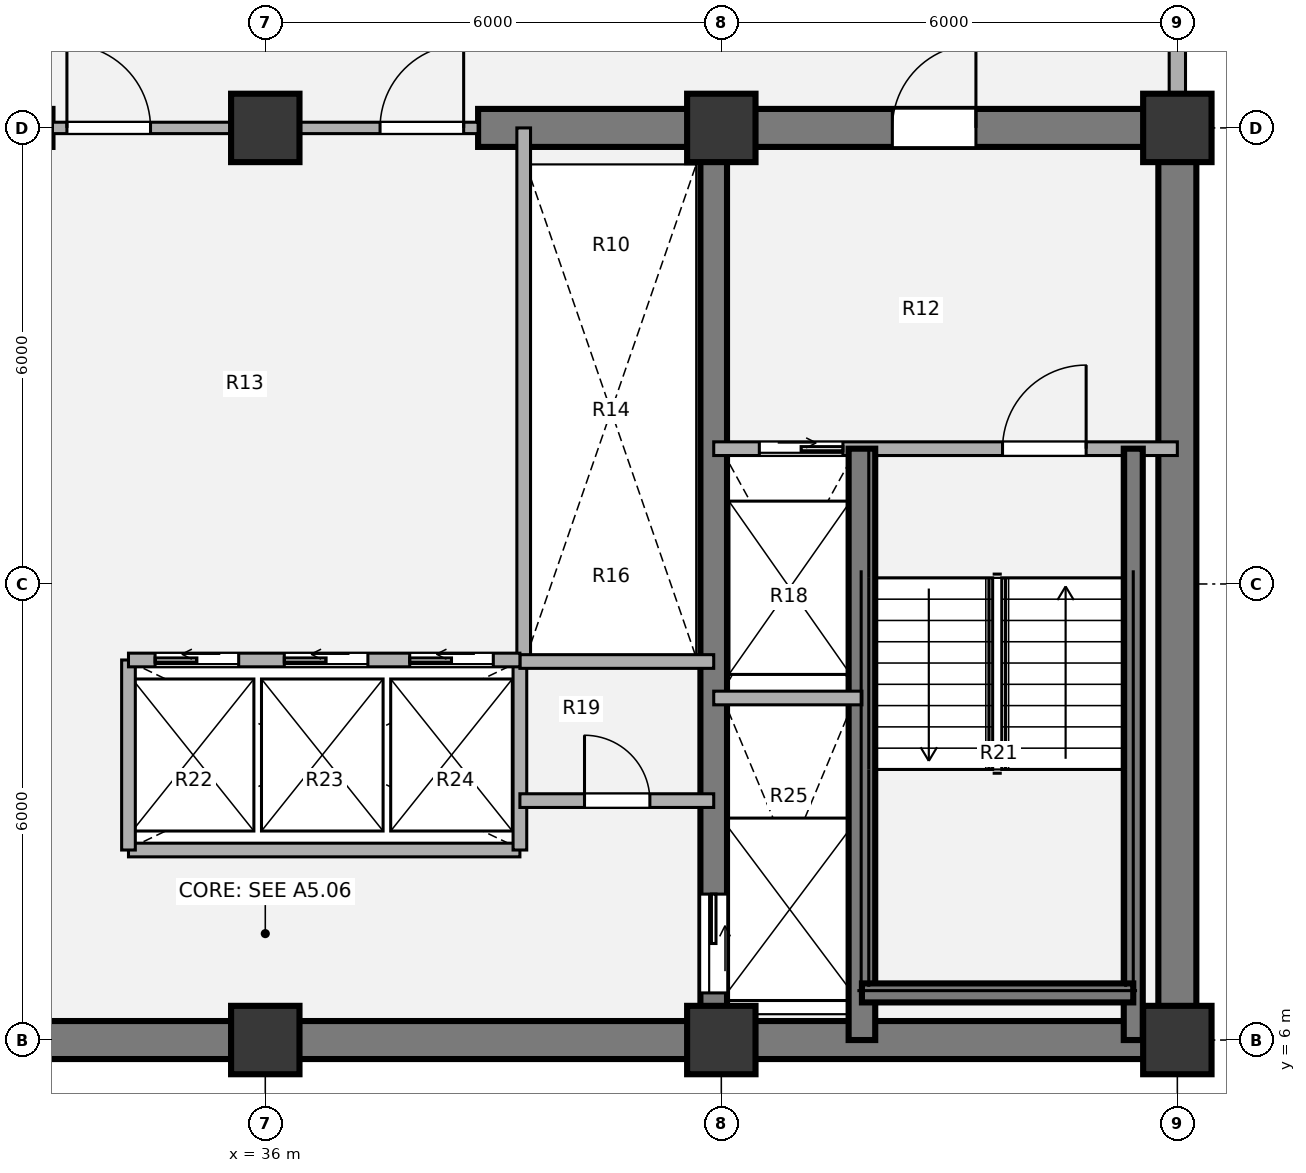
"""IFC4 building model, lengths in metres.
Left out: names, types, materials, properties, quantities, classifications, styles, units other than length and angle.
Written with IfcOpenShell. Run it as: python <this file> out.ifc"""

import sys

from ifc_helpers import new_model, si_unit, direction, frame, frame_2d, origin, origin_2d, place, context, subcontext, project, spatial, rectangle, extrude, source, transform, mapped, element, fill, save


model = new_model("IFC4")
c1 = context("Model", 3, precision=1e-05, world=origin(), true_north=direction((0.0, 1.0)))
c2 = subcontext(c1, "Body", "Model", "MODEL_VIEW")
j1 = project(units=[si_unit("LENGTHUNIT", "METRE"), si_unit("PLANEANGLEUNIT", "RADIAN")], contexts=[c1])
p1 = place(None, origin())
s1 = spatial("IfcSite", under=j1, at=p1, CompositionType="ELEMENT")
p2 = place(p1, origin())
s2 = spatial("IfcBuilding", under=s1, at=p2, CompositionType="ELEMENT")
p3 = place(p2, frame((0.0, 0.0, 116.28)))
s3 = spatial("IfcBuildingStorey", under=s2, at=p3, CompositionType="ELEMENT", Elevation=116.28)
m1 = source(origin(), c2, "Body", "SweptSolid", [
    extrude(rectangle(XDim=0.9, YDim=0.9, at=origin_2d()), origin(), (0.0, 0.0, 1.0), 3.78),
])
for number, where, z_axis, x_axis in (
    (1, (36.0, 6.0, 0.0), (0.0, 0.0, 1.0), (1.0, 0.0, 0.0)),
    (2, (42.0, 6.0, 0.0), (0.0, 0.0, 1.0), (1.0, 0.0, 0.0)),
    (3, (48.0, 6.0, 0.0), (0.0, 0.0, 1.0), (1.0, 0.0, 0.0)),
    (4, (36.0, 18.0, 0.0), (0.0, 0.0, 1.0), (1.0, 0.0, 0.0)),
    (5, (42.0, 18.0, 0.0), (0.0, 0.0, 1.0), (1.0, 0.0, 0.0)),
    (6, (48.0, 18.0, 0.0), (0.0, 0.0, 1.0), (1.0, 0.0, 0.0)),
):
    element("IfcColumn", number, at=place(p3, frame(where, z_axis=z_axis, x_axis=x_axis)), inside=s3, PredefinedType="COLUMN", context=c2, shape_type="MappedRepresentation", body=[
        mapped(m1, transform((0.0, 0.0, 0.0), x_axis=(1.0, 0.0, 0.0), y_axis=(0.0, 1.0, 0.0), z_axis=(0.0, 0.0, 1.0), scale=1.0)),
    ])
p4 = place(p3, frame((48.25, 6.0, 0.0), z_axis=(0.0, 0.0, 1.0), x_axis=(-1.0, 0.0, 0.0)))
e7 = element("IfcWall", 7, at=p4, inside=s3, PredefinedType="SHEAR", context=c2, shape_type="SweptSolid", body=[
    extrude(rectangle(XDim=24.5, YDim=0.5, at=frame_2d((12.25, 0.0))), origin(), (0.0, 0.0, 1.0), 3.78),
])
p5 = place(p3, frame((48.0, 18.0, 0.0), z_axis=(0.0, 0.0, 1.0), x_axis=(0.0, -1.0, 0.0)))
e8 = element("IfcWall", 8, at=p5, inside=s3, PredefinedType="SHEAR", context=c2, shape_type="SweptSolid", body=[
    extrude(rectangle(XDim=12.0, YDim=0.5, at=frame_2d((6.0, 0.0))), origin(), (0.0, 0.0, 1.0), 3.78),
])
p6 = place(p3, frame((23.75, 18.0, 0.0), z_axis=(0.0, 0.0, 1.0), x_axis=(1.0, 0.0, 0.0)))
e9 = element("IfcWall", 9, at=p6, inside=s3, PredefinedType="SHEAR", context=c2, shape_type="SweptSolid", body=[
    extrude(rectangle(XDim=9.45, YDim=0.5, at=frame_2d((4.725, 0.0))), origin(), (0.0, 0.0, 1.0), 3.78),
])
p7 = place(p6, frame((2.95, 0.0, 0.0)))
e10 = element("IfcOpeningElement", 10, at=p7, cuts=e9, PredefinedType="OPENING", context=c2, shape_type="SweptSolid", body=[
    extrude(rectangle(XDim=1.1, YDim=2.1, at=origin_2d()), frame((0.55, 0.26, 1.05), z_axis=(0.0, -1.0, 0.0), x_axis=(1.0, 0.0, 0.0)), (0.0, 0.0, 1.0), 0.52),
])
p8 = place(p3, frame((38.8, 18.0, 0.0), z_axis=(0.0, 0.0, 1.0), x_axis=(1.0, 0.0, 0.0)))
e11 = element("IfcWall", 11, at=p8, inside=s3, PredefinedType="SHEAR", context=c2, shape_type="SweptSolid", body=[
    extrude(rectangle(XDim=9.45, YDim=0.5, at=frame_2d((4.725, 0.0))), origin(), (0.0, 0.0, 1.0), 3.78),
])
p9 = place(p8, frame((5.45, 0.0, 0.0)))
e12 = element("IfcOpeningElement", 12, at=p9, cuts=e11, PredefinedType="OPENING", context=c2, shape_type="SweptSolid", body=[
    extrude(rectangle(XDim=1.1, YDim=2.1, at=origin_2d()), frame((0.55, 0.26, 1.05), z_axis=(0.0, -1.0, 0.0), x_axis=(1.0, 0.0, 0.0)), (0.0, 0.0, 1.0), 0.52),
])
p10 = place(p3, frame((41.9, 18.0, 0.0), z_axis=(0.0, 0.0, 1.0), x_axis=(0.0, -1.0, 0.0)))
e13 = element("IfcWall", 13, at=p10, inside=s3, PredefinedType="SHEAR", context=c2, shape_type="SweptSolid", body=[
    extrude(rectangle(XDim=12.0, YDim=0.35, at=frame_2d((6.0, 0.0))), origin(), (0.0, 0.0, 1.0), 3.78),
])
p11 = place(p10, frame((10.08, 0.0, 0.0)))
e14 = element("IfcOpeningElement", 14, at=p11, cuts=e13, PredefinedType="OPENING", context=c2, shape_type="SweptSolid", body=[
    extrude(rectangle(XDim=1.3, YDim=2.1, at=origin_2d()), frame((0.65, 0.185, 1.05), z_axis=(0.0, -1.0, 0.0), x_axis=(1.0, 0.0, 0.0)), (0.0, 0.0, 1.0), 0.37),
])
p12 = place(p3, frame((48.0, 21.05, 0.0), z_axis=(0.0, 0.0, 1.0), x_axis=(0.0, -1.0, 0.0)))
e15 = element("IfcWall", 15, at=p12, inside=s3, PredefinedType="SOLIDWALL", context=c2, shape_type="SweptSolid", body=[
    extrude(rectangle(XDim=2.62, YDim=0.215, at=frame_2d((1.31, 0.0))), origin(), (0.0, 0.0, 1.0), 3.53),
])
p13 = place(p3, frame((34.2, 8.5, 0.0), z_axis=(0.0, 0.0, 1.0), x_axis=(1.0, 0.0, 0.0)))
e16 = element("IfcWall", 16, at=p13, inside=s3, PredefinedType="PARTITIONING", context=c2, shape_type="SweptSolid", body=[
    extrude(rectangle(XDim=5.15, YDim=0.18, at=frame_2d((2.575, 0.0))), origin(), (0.0, 0.0, 1.0), 3.5),
])
for number, where, z_axis, x_axis in (
    (17, (34.2, 8.5, 0.0), (0.0, 0.0, 1.0), (0.0, 1.0, 0.0)),
    (18, (39.35, 8.5, 0.0), (0.0, 0.0, 1.0), (0.0, 1.0, 0.0)),
):
    element("IfcWall", number, at=place(p3, frame(where, z_axis=z_axis, x_axis=x_axis)), inside=s3, PredefinedType="PARTITIONING", context=c2, shape_type="SweptSolid", body=[
        extrude(rectangle(XDim=2.5, YDim=0.18, at=frame_2d((1.25, 0.0))), origin(), (0.0, 0.0, 1.0), 3.5),
    ])
p14 = place(p3, frame((39.4, 11.0, 0.0), z_axis=(0.0, 0.0, 1.0), x_axis=(0.0, 1.0, 0.0)))
e19 = element("IfcWall", 19, at=p14, inside=s3, PredefinedType="PARTITIONING", context=c2, shape_type="SweptSolid", body=[
    extrude(rectangle(XDim=7.0, YDim=0.18, at=frame_2d((3.5, 0.0))), origin(), (0.0, 0.0, 1.0), 3.5),
])
p15 = place(p3, frame((39.35, 10.98, 0.0), z_axis=(0.0, 0.0, 1.0), x_axis=(1.0, 0.0, 0.0)))
e20 = element("IfcWall", 20, at=p15, inside=s3, PredefinedType="PARTITIONING", context=c2, shape_type="SweptSolid", body=[
    extrude(rectangle(XDim=2.55, YDim=0.18, at=frame_2d((1.275, 0.0))), origin(), (0.0, 0.0, 1.0), 3.5),
])
p16 = place(p3, frame((39.35, 9.15, 0.0), z_axis=(0.0, 0.0, 1.0), x_axis=(1.0, 0.0, 0.0)))
e21 = element("IfcWall", 21, at=p16, inside=s3, PredefinedType="PARTITIONING", context=c2, shape_type="SweptSolid", body=[
    extrude(rectangle(XDim=2.55, YDim=0.18, at=frame_2d((1.275, 0.0))), origin(), (0.0, 0.0, 1.0), 3.5),
])
p17 = place(p16, frame((0.85, 0.0, 0.0)))
e22 = element("IfcOpeningElement", 22, at=p17, cuts=e21, PredefinedType="OPENING", context=c2, shape_type="SweptSolid", body=[
    extrude(rectangle(XDim=0.86, YDim=2.1, at=origin_2d()), frame((0.43, 0.1, 1.05), z_axis=(0.0, -1.0, 0.0), x_axis=(1.0, 0.0, 0.0)), (0.0, 0.0, 1.0), 0.2),
])
p18 = place(p3, frame((33.2, 18.0, 0.0), z_axis=(0.0, 0.0, 1.0), x_axis=(1.0, 0.0, 0.0)))
e23 = element("IfcWall", 23, at=p18, inside=s3, PredefinedType="PARTITIONING", context=c2, shape_type="SweptSolid", body=[
    extrude(rectangle(XDim=5.6, YDim=0.15, at=frame_2d((2.8, 0.0))), origin(), (0.0, 0.0, 1.0), 2.315),
])
p19 = place(p18, frame((0.19, 0.0, 0.0)))
e24 = element("IfcOpeningElement", 24, at=p19, cuts=e23, PredefinedType="OPENING", context=c2, shape_type="SweptSolid", body=[
    extrude(rectangle(XDim=1.1, YDim=2.1, at=origin_2d()), frame((0.55, 0.085, 1.05), z_axis=(0.0, -1.0, 0.0), x_axis=(1.0, 0.0, 0.0)), (0.0, 0.0, 1.0), 0.17),
])
p20 = place(p18, frame((4.31, 0.0, 0.0)))
e25 = element("IfcOpeningElement", 25, at=p20, cuts=e23, PredefinedType="OPENING", context=c2, shape_type="SweptSolid", body=[
    extrude(rectangle(XDim=1.1, YDim=2.1, at=origin_2d()), frame((0.55, 0.085, 1.05), z_axis=(0.0, -1.0, 0.0), x_axis=(1.0, 0.0, 0.0)), (0.0, 0.0, 1.0), 0.17),
])
p21 = place(p3, frame((41.9, 13.78, 0.0), z_axis=(0.0, 0.0, 1.0), x_axis=(1.0, 0.0, 0.0)))
e26 = element("IfcWall", 26, at=p21, inside=s3, PredefinedType="PARTITIONING", context=c2, shape_type="SweptSolid", body=[
    extrude(rectangle(XDim=6.1, YDim=0.18, at=frame_2d((3.05, 0.0))), origin(), (0.0, 0.0, 1.0), 3.5),
])
p22 = place(p21, frame((0.6, 0.0, 0.0)))
e27 = element("IfcOpeningElement", 27, at=p22, cuts=e26, PredefinedType="OPENING", context=c2, shape_type="SweptSolid", body=[
    extrude(rectangle(XDim=1.1, YDim=2.1, at=origin_2d()), frame((0.55, 0.1, 1.05), z_axis=(0.0, -1.0, 0.0), x_axis=(1.0, 0.0, 0.0)), (0.0, 0.0, 1.0), 0.2),
])
p23 = place(p21, frame((3.8, 0.0, 0.0)))
e28 = element("IfcOpeningElement", 28, at=p23, cuts=e26, PredefinedType="OPENING", context=c2, shape_type="SweptSolid", body=[
    extrude(rectangle(XDim=1.1, YDim=2.1, at=origin_2d()), frame((0.55, 0.1, 1.05), z_axis=(0.0, -1.0, 0.0), x_axis=(1.0, 0.0, 0.0)), (0.0, 0.0, 1.0), 0.2),
])
p24 = place(p3, frame((43.85, 6.0, 0.0), z_axis=(0.0, 0.0, 1.0), x_axis=(0.0, 1.0, 0.0)))
e29 = element("IfcWall", 29, at=p24, inside=s3, PredefinedType="SHEAR", context=c2, shape_type="SweptSolid", body=[
    extrude(rectangle(XDim=7.78, YDim=0.35, at=frame_2d((3.89, 0.0))), origin(), (0.0, 0.0, 1.0), 3.85),
])
p25 = place(p3, frame((47.42, 6.0, 0.0), z_axis=(0.0, 0.0, 1.0), x_axis=(0.0, 1.0, 0.0)))
e30 = element("IfcWall", 30, at=p25, inside=s3, PredefinedType="SHEAR", context=c2, shape_type="SweptSolid", body=[
    extrude(rectangle(XDim=7.78, YDim=0.25, at=frame_2d((3.89, 0.0))), origin(), (0.0, 0.0, 1.0), 3.85),
])
p26 = place(p3, frame((43.85, 6.62, 0.0), z_axis=(0.0, 0.0, 1.0), x_axis=(1.0, 0.0, 0.0)))
e31 = element("IfcWall", 31, at=p26, inside=s3, PredefinedType="SHEAR", context=c2, shape_type="SweptSolid", body=[
    extrude(rectangle(XDim=3.57, YDim=0.25, at=frame_2d((1.785, 0.0))), origin(), (0.0, 0.0, 1.0), 3.85),
])
p27 = place(p3, frame((41.9, 10.5, 0.0), z_axis=(0.0, 0.0, 1.0), x_axis=(1.0, 0.0, 0.0)))
e32 = element("IfcWall", 32, at=p27, inside=s3, PredefinedType="PARTITIONING", context=c2, shape_type="SweptSolid", body=[
    extrude(rectangle(XDim=1.95, YDim=0.18, at=frame_2d((0.975, 0.0))), origin(), (0.0, 0.0, 1.0), 3.5),
])
p28 = place(p3, frame((34.2, 11.0, 0.0), z_axis=(0.0, 0.0, 1.0), x_axis=(1.0, 0.0, 0.0)))
e33 = element("IfcWall", 33, at=p28, inside=s3, PredefinedType="PARTITIONING", context=c2, shape_type="SweptSolid", body=[
    extrude(rectangle(XDim=5.15, YDim=0.18, at=frame_2d((2.575, 0.0))), origin(), (0.0, 0.0, 1.0), 3.5),
])
p29 = place(p28, frame((0.35, 0.0, 0.0)))
e34 = element("IfcOpeningElement", 34, at=p29, cuts=e33, PredefinedType="OPENING", context=c2, shape_type="SweptSolid", body=[
    extrude(rectangle(XDim=1.1, YDim=2.1, at=origin_2d()), frame((0.55, 0.1, 1.05), z_axis=(0.0, -1.0, 0.0), x_axis=(1.0, 0.0, 0.0)), (0.0, 0.0, 1.0), 0.2),
])
p30 = place(p28, frame((2.05, 0.0, 0.0)))
e35 = element("IfcOpeningElement", 35, at=p30, cuts=e33, PredefinedType="OPENING", context=c2, shape_type="SweptSolid", body=[
    extrude(rectangle(XDim=1.1, YDim=2.1, at=origin_2d()), frame((0.55, 0.1, 1.05), z_axis=(0.0, -1.0, 0.0), x_axis=(1.0, 0.0, 0.0)), (0.0, 0.0, 1.0), 0.2),
])
p31 = place(p28, frame((3.7, 0.0, 0.0)))
e36 = element("IfcOpeningElement", 36, at=p31, cuts=e33, PredefinedType="OPENING", context=c2, shape_type="SweptSolid", body=[
    extrude(rectangle(XDim=1.1, YDim=2.1, at=origin_2d()), frame((0.55, 0.1, 1.05), z_axis=(0.0, -1.0, 0.0), x_axis=(1.0, 0.0, 0.0)), (0.0, 0.0, 1.0), 0.2),
])
m2 = source(origin(), c2, "Body", "SweptSolid", [
    extrude(rectangle(XDim=0.86, YDim=2.1, at=origin_2d()), frame((0.43, 0.025, 1.05), z_axis=(0.0, -1.0, 0.0), x_axis=(1.0, 0.0, 0.0)), (0.0, 0.0, 1.0), 0.05),
])
p32 = place(p17, origin())
e37 = element("IfcDoor", 37, at=p32, inside=s3, OperationType="SINGLE_SWING_LEFT", PredefinedType="DOOR", context=c2, shape_type="MappedRepresentation", body=[
    mapped(m2, transform((0.0, 0.0, 0.0), x_axis=(1.0, 0.0, 0.0), y_axis=(0.0, 1.0, 0.0), z_axis=(0.0, 0.0, 1.0), scale=1.0)),
])
fill(e22, e37)
m3 = source(origin(), c2, "Body", "SweptSolid", [
    extrude(rectangle(XDim=1.1, YDim=2.1, at=origin_2d()), frame((0.55, 0.025, 1.05), z_axis=(0.0, -1.0, 0.0), x_axis=(1.0, 0.0, 0.0)), (0.0, 0.0, 1.0), 0.05),
])
p33 = place(p19, origin())
e38 = element("IfcDoor", 38, at=p33, inside=s3, OperationType="SINGLE_SWING_LEFT", PredefinedType="DOOR", context=c2, shape_type="MappedRepresentation", body=[
    mapped(m3, transform((0.0, 0.0, 0.0), x_axis=(1.0, 0.0, 0.0), y_axis=(0.0, 1.0, 0.0), z_axis=(0.0, 0.0, 1.0), scale=1.0)),
])
fill(e24, e38)
p34 = place(p20, origin())
e39 = element("IfcDoor", 39, at=p34, inside=s3, OperationType="SINGLE_SWING_RIGHT", PredefinedType="DOOR", context=c2, shape_type="MappedRepresentation", body=[
    mapped(m3, transform((0.0, 0.0, 0.0), x_axis=(1.0, 0.0, 0.0), y_axis=(0.0, 1.0, 0.0), z_axis=(0.0, 0.0, 1.0), scale=1.0)),
])
fill(e25, e39)
m4 = source(origin(), c2, "Body", "SweptSolid", [
    extrude(rectangle(XDim=1.1, YDim=2.1, at=origin_2d()), frame((0.55, 0.025, 1.05), z_axis=(0.0, -1.0, 0.0), x_axis=(1.0, 0.0, 0.0)), (0.0, 0.0, 1.0), 0.05),
])
p35 = place(p22, origin())
e40 = element("IfcDoor", 40, at=p35, inside=s3, OperationType="SLIDING_TO_RIGHT", PredefinedType="DOOR", context=c2, shape_type="MappedRepresentation", body=[
    mapped(m4, transform((0.0, 0.0, 0.0), x_axis=(1.0, 0.0, 0.0), y_axis=(0.0, 1.0, 0.0), z_axis=(0.0, 0.0, 1.0), scale=1.0)),
])
fill(e27, e40)
m5 = source(origin(), c2, "Body", "SweptSolid", [
    extrude(rectangle(XDim=1.1, YDim=2.1, at=origin_2d()), frame((0.55, 0.025, 1.05), z_axis=(0.0, -1.0, 0.0), x_axis=(1.0, 0.0, 0.0)), (0.0, 0.0, 1.0), 0.05),
])
p36 = place(p23, origin())
e41 = element("IfcDoor", 41, at=p36, inside=s3, OperationType="SINGLE_SWING_RIGHT", PredefinedType="DOOR", context=c2, shape_type="MappedRepresentation", body=[
    mapped(m5, transform((0.0, 0.0, 0.0), x_axis=(1.0, 0.0, 0.0), y_axis=(0.0, 1.0, 0.0), z_axis=(0.0, 0.0, 1.0), scale=1.0)),
])
fill(e28, e41)
m6 = source(origin(), c2, "Body", "SweptSolid", [
    extrude(rectangle(XDim=1.3, YDim=2.1, at=origin_2d()), frame((0.65, 0.025, 1.05), z_axis=(0.0, -1.0, 0.0), x_axis=(1.0, 0.0, 0.0)), (0.0, 0.0, 1.0), 0.05),
])
p37 = place(p11, origin())
e42 = element("IfcDoor", 42, at=p37, inside=s3, OperationType="SLIDING_TO_LEFT", PredefinedType="DOOR", context=c2, shape_type="MappedRepresentation", body=[
    mapped(m6, transform((0.0, 0.0, 0.0), x_axis=(1.0, 0.0, 0.0), y_axis=(0.0, 1.0, 0.0), z_axis=(0.0, 0.0, 1.0), scale=1.0)),
])
fill(e14, e42)
p38 = place(p9, origin())
e43 = element("IfcDoor", 43, at=p38, inside=s3, OperationType="SINGLE_SWING_RIGHT", PredefinedType="DOOR", context=c2, shape_type="MappedRepresentation", body=[
    mapped(m3, transform((0.0, 0.0, 0.0), x_axis=(1.0, 0.0, 0.0), y_axis=(0.0, 1.0, 0.0), z_axis=(0.0, 0.0, 1.0), scale=1.0)),
])
fill(e12, e43)
p39 = place(p29, origin())
e44 = element("IfcDoor", 44, at=p39, inside=s3, OperationType="SLIDING_TO_LEFT", PredefinedType="DOOR", context=c2, shape_type="MappedRepresentation", body=[
    mapped(m4, transform((0.0, 0.0, 0.0), x_axis=(1.0, 0.0, 0.0), y_axis=(0.0, 1.0, 0.0), z_axis=(0.0, 0.0, 1.0), scale=1.0)),
])
fill(e34, e44)
p40 = place(p30, origin())
e45 = element("IfcDoor", 45, at=p40, inside=s3, OperationType="SLIDING_TO_LEFT", PredefinedType="DOOR", context=c2, shape_type="MappedRepresentation", body=[
    mapped(m4, transform((0.0, 0.0, 0.0), x_axis=(1.0, 0.0, 0.0), y_axis=(0.0, 1.0, 0.0), z_axis=(0.0, 0.0, 1.0), scale=1.0)),
])
fill(e35, e45)
p41 = place(p31, origin())
e46 = element("IfcDoor", 46, at=p41, inside=s3, OperationType="SLIDING_TO_LEFT", PredefinedType="DOOR", context=c2, shape_type="MappedRepresentation", body=[
    mapped(m4, transform((0.0, 0.0, 0.0), x_axis=(1.0, 0.0, 0.0), y_axis=(0.0, 1.0, 0.0), z_axis=(0.0, 0.0, 1.0), scale=1.0)),
])
fill(e36, e46)
save(model, sys.argv[1])
